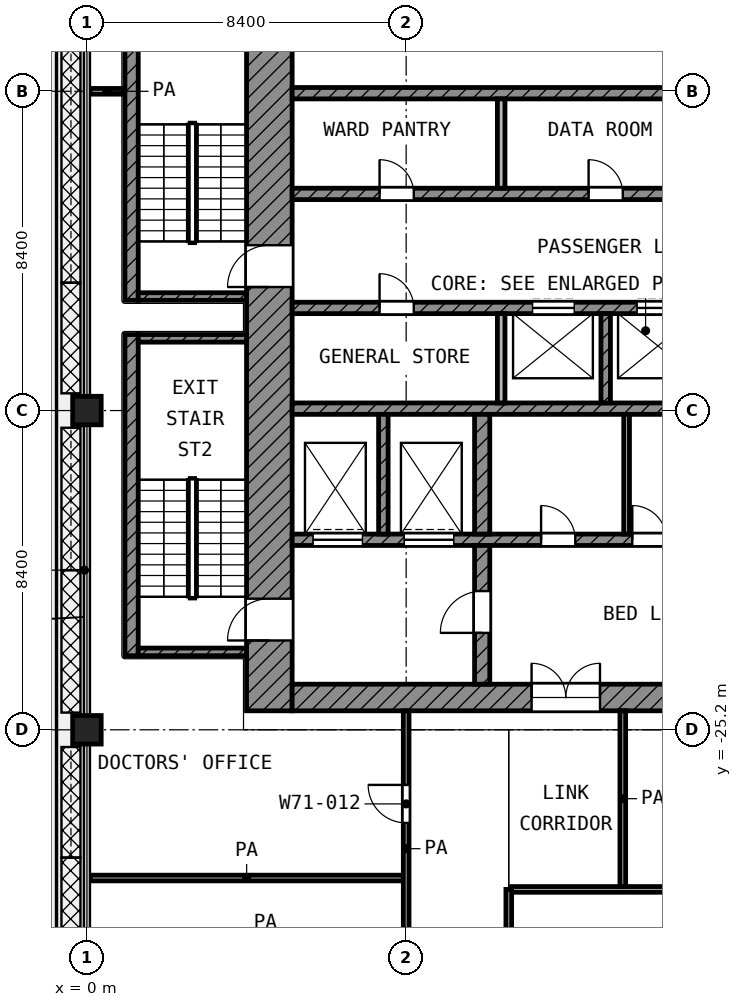
"""IFC4 building model, lengths in metres.
Left out: names, types, materials, properties, quantities, classifications, styles, units other than length and angle.
Written with IfcOpenShell. Run it as: python <this file> out.ifc"""

import sys

from ifc_helpers import new_model, si_unit, direction, frame, frame_2d, origin, origin_2d, place, context, subcontext, project, spatial, rectangle, extrude, element, fill, save


model = new_model("IFC4")
c1 = context("Model", 3, precision=1e-05, world=origin(), true_north=direction((0.0, 1.0)))
c2 = subcontext(c1, "Body", "Model", "MODEL_VIEW")
j1 = project(units=[si_unit("LENGTHUNIT", "METRE"), si_unit("PLANEANGLEUNIT", "RADIAN")], contexts=[c1])
p1 = place(None, origin())
s1 = spatial("IfcSite", under=j1, at=p1, CompositionType="ELEMENT")
p2 = place(p1, origin())
s2 = spatial("IfcBuilding", under=s1, at=p2, CompositionType="ELEMENT")
p3 = place(p2, frame((0.0, 0.0, 328.0)))
s3 = spatial("IfcBuildingStorey", under=s2, at=p3, CompositionType="ELEMENT", Elevation=328.0)
for number, where, z_axis, x_axis in (
    (1, (0.0, -16.8, 0.0), (0.0, 0.0, 1.0), (1.0, 0.0, 0.0)),
    (2, (0.0, -25.2, 0.0), (0.0, 0.0, 1.0), (1.0, 0.0, 0.0)),
):
    element("IfcColumn", number, at=place(p3, frame(where, z_axis=z_axis, x_axis=x_axis)), inside=s3, PredefinedType="COLUMN", context=c2, shape_type="SweptSolid", body=[
        extrude(rectangle(XDim=0.75, YDim=0.75, at=origin_2d()), origin(), (0.0, 0.0, 1.0), 4.2),
    ])
p4 = place(p3, frame((4.8, -24.7, 0.0), z_axis=(0.0, 0.0, 1.0), x_axis=(0.0, 1.0, 0.0)))
e3 = element("IfcWall", 3, at=p4, inside=s3, PredefinedType="SHEAR", context=c2, shape_type="SweptSolid", body=[
    extrude(rectangle(XDim=19.3, YDim=1.2, at=frame_2d((9.65, 0.0))), origin(), (0.0, 0.0, 1.0), 3.78),
])
p5 = place(p4, frame((11.15, 0.0, 0.0)))
e4 = element("IfcOpeningElement", 4, at=p5, cuts=e3, PredefinedType="OPENING", context=c2, shape_type="SweptSolid", body=[
    extrude(rectangle(XDim=1.1, YDim=2.1, at=frame_2d((0.55, 1.05))), frame((0.0, 0.61, 0.0), z_axis=(0.0, -1.0, 0.0), x_axis=(1.0, 0.0, 0.0)), (0.0, 0.0, 1.0), 1.22),
])
p6 = place(p4, frame((1.85, 0.0, 0.0)))
e5 = element("IfcOpeningElement", 5, at=p6, cuts=e3, PredefinedType="OPENING", context=c2, shape_type="SweptSolid", body=[
    extrude(rectangle(XDim=1.1, YDim=2.1, at=frame_2d((0.55, 1.05))), frame((0.0, 0.61, 0.0), z_axis=(0.0, -1.0, 0.0), x_axis=(1.0, 0.0, 0.0)), (0.0, 0.0, 1.0), 1.22),
])
p7 = place(p3, frame((5.4, -24.35, 0.0), z_axis=(0.0, 0.0, 1.0), x_axis=(1.0, 0.0, 0.0)))
e6 = element("IfcWall", 6, at=p7, inside=s3, PredefinedType="SHEAR", context=c2, shape_type="SweptSolid", body=[
    extrude(rectangle(XDim=18.6, YDim=0.7, at=frame_2d((9.3, 0.0))), origin(), (0.0, 0.0, 1.0), 3.78),
])
p8 = place(p7, frame((6.3, 0.0, 0.0)))
e7 = element("IfcOpeningElement", 7, at=p8, cuts=e6, PredefinedType="OPENING", context=c2, shape_type="SweptSolid", body=[
    extrude(rectangle(XDim=1.8, YDim=2.1, at=frame_2d((0.9, 1.05))), frame((0.0, 0.36, 0.0), z_axis=(0.0, -1.0, 0.0), x_axis=(1.0, 0.0, 0.0)), (0.0, 0.0, 1.0), 0.72),
])
p9 = place(p3, frame((5.4, -8.45, 0.0), z_axis=(0.0, 0.0, 1.0), x_axis=(1.0, 0.0, 0.0)))
e8 = element("IfcWall", 8, at=p9, inside=s3, PredefinedType="SHEAR", context=c2, shape_type="SweptSolid", body=[
    extrude(rectangle(XDim=16.65, YDim=0.3, at=frame_2d((8.325, 0.0))), origin(), (0.0, 0.0, 1.0), 3.78),
])
p10 = place(p3, frame((5.4, -11.1, 0.0), z_axis=(0.0, 0.0, 1.0), x_axis=(1.0, 0.0, 0.0)))
e9 = element("IfcWall", 9, at=p10, inside=s3, PredefinedType="SHEAR", context=c2, shape_type="SweptSolid", body=[
    extrude(rectangle(XDim=16.65, YDim=0.3, at=frame_2d((8.325, 0.0))), origin(), (0.0, 0.0, 1.0), 3.78),
])
p11 = place(p10, frame((2.3, 0.0, 0.0)))
e10 = element("IfcOpeningElement", 10, at=p11, cuts=e9, PredefinedType="OPENING", context=c2, shape_type="SweptSolid", body=[
    extrude(rectangle(XDim=0.9, YDim=2.1, at=frame_2d((0.45, 1.05))), frame((0.0, 0.16, 0.0), z_axis=(0.0, -1.0, 0.0), x_axis=(1.0, 0.0, 0.0)), (0.0, 0.0, 1.0), 0.32),
])
p12 = place(p10, frame((7.8, 0.0, 0.0)))
e11 = element("IfcOpeningElement", 11, at=p12, cuts=e9, PredefinedType="OPENING", context=c2, shape_type="SweptSolid", body=[
    extrude(rectangle(XDim=0.9, YDim=2.1, at=frame_2d((0.45, 1.05))), frame((0.0, 0.16, 0.0), z_axis=(0.0, -1.0, 0.0), x_axis=(1.0, 0.0, 0.0)), (0.0, 0.0, 1.0), 0.32),
])
p13 = place(p10, frame((13.3, 0.0, 0.0)))
e12 = element("IfcOpeningElement", 12, at=p13, cuts=e9, PredefinedType="OPENING", context=c2, shape_type="SweptSolid", body=[
    extrude(rectangle(XDim=0.9, YDim=2.1, at=frame_2d((0.45, 1.05))), frame((0.0, 0.16, 0.0), z_axis=(0.0, -1.0, 0.0), x_axis=(1.0, 0.0, 0.0)), (0.0, 0.0, 1.0), 0.32),
])
p14 = place(p3, frame((5.4, -14.1, 0.0), z_axis=(0.0, 0.0, 1.0), x_axis=(1.0, 0.0, 0.0)))
e13 = element("IfcWall", 13, at=p14, inside=s3, PredefinedType="SHEAR", context=c2, shape_type="SweptSolid", body=[
    extrude(rectangle(XDim=16.65, YDim=0.3, at=frame_2d((8.325, 0.0))), origin(), (0.0, 0.0, 1.0), 3.78),
])
p15 = place(p14, frame((6.325, 0.0, 0.0)))
e14 = element("IfcOpeningElement", 14, at=p15, cuts=e13, PredefinedType="OPENING", context=c2, shape_type="SweptSolid", body=[
    extrude(rectangle(XDim=1.1, YDim=2.1, at=frame_2d((0.55, 1.05))), frame((0.0, 0.16, 0.0), z_axis=(0.0, -1.0, 0.0), x_axis=(1.0, 0.0, 0.0)), (0.0, 0.0, 1.0), 0.32),
])
p16 = place(p14, frame((9.075, 0.0, 0.0)))
e15 = element("IfcOpeningElement", 15, at=p16, cuts=e13, PredefinedType="OPENING", context=c2, shape_type="SweptSolid", body=[
    extrude(rectangle(XDim=1.1, YDim=2.1, at=frame_2d((0.55, 1.05))), frame((0.0, 0.16, 0.0), z_axis=(0.0, -1.0, 0.0), x_axis=(1.0, 0.0, 0.0)), (0.0, 0.0, 1.0), 0.32),
])
p17 = place(p14, frame((11.825, 0.0, 0.0)))
e16 = element("IfcOpeningElement", 16, at=p17, cuts=e13, PredefinedType="OPENING", context=c2, shape_type="SweptSolid", body=[
    extrude(rectangle(XDim=1.1, YDim=2.1, at=frame_2d((0.55, 1.05))), frame((0.0, 0.16, 0.0), z_axis=(0.0, -1.0, 0.0), x_axis=(1.0, 0.0, 0.0)), (0.0, 0.0, 1.0), 0.32),
])
p18 = place(p14, frame((14.575, 0.0, 0.0)))
e17 = element("IfcOpeningElement", 17, at=p18, cuts=e13, PredefinedType="OPENING", context=c2, shape_type="SweptSolid", body=[
    extrude(rectangle(XDim=1.1, YDim=2.1, at=frame_2d((0.55, 1.05))), frame((0.0, 0.16, 0.0), z_axis=(0.0, -1.0, 0.0), x_axis=(1.0, 0.0, 0.0)), (0.0, 0.0, 1.0), 0.32),
])
p19 = place(p14, frame((2.3, 0.0, 0.0)))
e18 = element("IfcOpeningElement", 18, at=p19, cuts=e13, PredefinedType="OPENING", context=c2, shape_type="SweptSolid", body=[
    extrude(rectangle(XDim=0.9, YDim=2.1, at=frame_2d((0.45, 1.05))), frame((0.0, 0.16, 0.0), z_axis=(0.0, -1.0, 0.0), x_axis=(1.0, 0.0, 0.0)), (0.0, 0.0, 1.0), 0.32),
])
p20 = place(p3, frame((5.4, -16.75, 0.0), z_axis=(0.0, 0.0, 1.0), x_axis=(1.0, 0.0, 0.0)))
e19 = element("IfcWall", 19, at=p20, inside=s3, PredefinedType="SHEAR", context=c2, shape_type="SweptSolid", body=[
    extrude(rectangle(XDim=16.65, YDim=0.3, at=frame_2d((8.325, 0.0))), origin(), (0.0, 0.0, 1.0), 3.78),
])
p21 = place(p3, frame((5.4, -20.2, 0.0), z_axis=(0.0, 0.0, 1.0), x_axis=(1.0, 0.0, 0.0)))
e20 = element("IfcWall", 20, at=p21, inside=s3, PredefinedType="SHEAR", context=c2, shape_type="SweptSolid", body=[
    extrude(rectangle(XDim=14.65, YDim=0.3, at=frame_2d((7.325, 0.0))), origin(), (0.0, 0.0, 1.0), 3.78),
])
p22 = place(p21, frame((10.55, 0.0, 0.0)))
e21 = element("IfcOpeningElement", 21, at=p22, cuts=e20, PredefinedType="OPENING", context=c2, shape_type="SweptSolid", body=[
    extrude(rectangle(XDim=1.3, YDim=2.1, at=frame_2d((0.65, 1.05))), frame((0.0, 0.16, 0.0), z_axis=(0.0, -1.0, 0.0), x_axis=(1.0, 0.0, 0.0)), (0.0, 0.0, 1.0), 0.32),
])
p23 = place(p21, frame((12.95, 0.0, 0.0)))
e22 = element("IfcOpeningElement", 22, at=p23, cuts=e20, PredefinedType="OPENING", context=c2, shape_type="SweptSolid", body=[
    extrude(rectangle(XDim=1.3, YDim=2.1, at=frame_2d((0.65, 1.05))), frame((0.0, 0.16, 0.0), z_axis=(0.0, -1.0, 0.0), x_axis=(1.0, 0.0, 0.0)), (0.0, 0.0, 1.0), 0.32),
])
p24 = place(p21, frame((0.55, 0.0, 0.0)))
e23 = element("IfcOpeningElement", 23, at=p24, cuts=e20, PredefinedType="OPENING", context=c2, shape_type="SweptSolid", body=[
    extrude(rectangle(XDim=1.3, YDim=2.1, at=frame_2d((0.65, 1.05))), frame((0.0, 0.16, 0.0), z_axis=(0.0, -1.0, 0.0), x_axis=(1.0, 0.0, 0.0)), (0.0, 0.0, 1.0), 0.32),
])
p25 = place(p21, frame((2.95, 0.0, 0.0)))
e24 = element("IfcOpeningElement", 24, at=p25, cuts=e20, PredefinedType="OPENING", context=c2, shape_type="SweptSolid", body=[
    extrude(rectangle(XDim=1.3, YDim=2.1, at=frame_2d((0.65, 1.05))), frame((0.0, 0.16, 0.0), z_axis=(0.0, -1.0, 0.0), x_axis=(1.0, 0.0, 0.0)), (0.0, 0.0, 1.0), 0.32),
])
p26 = place(p21, frame((6.55, 0.0, 0.0)))
e25 = element("IfcOpeningElement", 25, at=p26, cuts=e20, PredefinedType="OPENING", context=c2, shape_type="SweptSolid", body=[
    extrude(rectangle(XDim=0.9, YDim=2.1, at=frame_2d((0.45, 1.05))), frame((0.0, 0.16, 0.0), z_axis=(0.0, -1.0, 0.0), x_axis=(1.0, 0.0, 0.0)), (0.0, 0.0, 1.0), 0.32),
])
p27 = place(p21, frame((8.95, 0.0, 0.0)))
e26 = element("IfcOpeningElement", 26, at=p27, cuts=e20, PredefinedType="OPENING", context=c2, shape_type="SweptSolid", body=[
    extrude(rectangle(XDim=0.9, YDim=2.1, at=frame_2d((0.45, 1.05))), frame((0.0, 0.16, 0.0), z_axis=(0.0, -1.0, 0.0), x_axis=(1.0, 0.0, 0.0)), (0.0, 0.0, 1.0), 0.32),
])
p28 = place(p3, frame((10.4, -24.0, 0.0), z_axis=(0.0, 0.0, 1.0), x_axis=(0.0, 1.0, 0.0)))
e27 = element("IfcWall", 27, at=p28, inside=s3, PredefinedType="SHEAR", context=c2, shape_type="SweptSolid", body=[
    extrude(rectangle(XDim=3.65, YDim=0.4, at=frame_2d((1.825, 0.0))), origin(), (0.0, 0.0, 1.0), 3.78),
])
p29 = place(p28, frame((1.35, 0.0, 0.0)))
e28 = element("IfcOpeningElement", 28, at=p29, cuts=e27, PredefinedType="OPENING", context=c2, shape_type="SweptSolid", body=[
    extrude(rectangle(XDim=1.1, YDim=2.1, at=frame_2d((0.55, 1.05))), frame((0.0, 0.21, 0.0), z_axis=(0.0, -1.0, 0.0), x_axis=(1.0, 0.0, 0.0)), (0.0, 0.0, 1.0), 0.42),
])
p30 = place(p3, frame((10.4, -20.05, 0.0), z_axis=(0.0, 0.0, 1.0), x_axis=(0.0, 1.0, 0.0)))
e29 = element("IfcWall", 29, at=p30, inside=s3, PredefinedType="SHEAR", context=c2, shape_type="SweptSolid", body=[
    extrude(rectangle(XDim=3.15, YDim=0.4, at=frame_2d((1.575, 0.0))), origin(), (0.0, 0.0, 1.0), 3.78),
])
p31 = place(p3, frame((7.8, -20.05, 0.0), z_axis=(0.0, 0.0, 1.0), x_axis=(0.0, 1.0, 0.0)))
e30 = element("IfcWall", 30, at=p31, inside=s3, PredefinedType="SHEAR", context=c2, shape_type="SweptSolid", body=[
    extrude(rectangle(XDim=3.15, YDim=0.25, at=frame_2d((1.575, 0.0))), origin(), (0.0, 0.0, 1.0), 3.78),
])
p32 = place(p3, frame((10.9, -10.95, 0.0), z_axis=(0.0, 0.0, 1.0), x_axis=(0.0, 1.0, 0.0)))
e31 = element("IfcWall", 31, at=p32, inside=s3, PredefinedType="PARTITIONING", context=c2, shape_type="SweptSolid", body=[
    extrude(rectangle(XDim=2.35, YDim=0.2, at=frame_2d((1.175, 0.0))), origin(), (0.0, 0.0, 1.0), 3.78),
])
p33 = place(p3, frame((10.9, -16.6, 0.0), z_axis=(0.0, 0.0, 1.0), x_axis=(0.0, 1.0, 0.0)))
e32 = element("IfcWall", 32, at=p33, inside=s3, PredefinedType="PARTITIONING", context=c2, shape_type="SweptSolid", body=[
    extrude(rectangle(XDim=2.35, YDim=0.2, at=frame_2d((1.175, 0.0))), origin(), (0.0, 0.0, 1.0), 3.78),
])
p34 = place(p3, frame((13.65, -16.6, 0.0), z_axis=(0.0, 0.0, 1.0), x_axis=(0.0, 1.0, 0.0)))
e33 = element("IfcWall", 33, at=p34, inside=s3, PredefinedType="SHEAR", context=c2, shape_type="SweptSolid", body=[
    extrude(rectangle(XDim=2.35, YDim=0.25, at=frame_2d((1.175, 0.0))), origin(), (0.0, 0.0, 1.0), 3.78),
])
p35 = place(p3, frame((14.2, -20.05, 0.0), z_axis=(0.0, 0.0, 1.0), x_axis=(0.0, 1.0, 0.0)))
e34 = element("IfcWall", 34, at=p35, inside=s3, PredefinedType="PARTITIONING", context=c2, shape_type="SweptSolid", body=[
    extrude(rectangle(XDim=3.15, YDim=0.15, at=frame_2d((1.575, 0.0))), origin(), (0.0, 0.0, 1.0), 3.78),
])
p36 = place(p3, frame((1.175, -13.9, 0.0), z_axis=(0.0, 0.0, 1.0), x_axis=(0.0, 1.0, 0.0)))
e35 = element("IfcWall", 35, at=p36, inside=s3, PredefinedType="SHEAR", context=c2, shape_type="SweptSolid", body=[
    extrude(rectangle(XDim=8.45, YDim=0.35, at=frame_2d((4.225, 0.0))), origin(), (0.0, 0.0, 1.0), 3.78),
])
p37 = place(p3, frame((1.35, -13.8, 0.0), z_axis=(0.0, 0.0, 1.0), x_axis=(1.0, 0.0, 0.0)))
e36 = element("IfcWall", 36, at=p37, inside=s3, PredefinedType="SHEAR", context=c2, shape_type="SweptSolid", body=[
    extrude(rectangle(XDim=2.85, YDim=0.2, at=frame_2d((1.425, 0.0))), origin(), (0.0, 0.0, 1.0), 3.78),
])
p38 = place(p3, frame((1.175, -23.25, 0.0), z_axis=(0.0, 0.0, 1.0), x_axis=(0.0, 1.0, 0.0)))
e37 = element("IfcWall", 37, at=p38, inside=s3, PredefinedType="SHEAR", context=c2, shape_type="SweptSolid", body=[
    extrude(rectangle(XDim=8.45, YDim=0.35, at=frame_2d((4.225, 0.0))), origin(), (0.0, 0.0, 1.0), 3.78),
])
for number, where, z_axis, x_axis in (
    (38, (1.35, -14.9, 0.0), (0.0, 0.0, 1.0), (1.0, 0.0, 0.0)),
    (39, (1.35, -23.15, 0.0), (0.0, 0.0, 1.0), (1.0, 0.0, 0.0)),
):
    element("IfcWall", number, at=place(p3, frame(where, z_axis=z_axis, x_axis=x_axis)), inside=s3, PredefinedType="SHEAR", context=c2, shape_type="SweptSolid", body=[
        extrude(rectangle(XDim=2.85, YDim=0.2, at=frame_2d((1.425, 0.0))), origin(), (0.0, 0.0, 1.0), 3.78),
    ])
p39 = place(p3, frame((11.175, -29.4, 0.0), z_axis=(0.0, 0.0, 1.0), x_axis=(1.0, 0.0, 0.0)))
e40 = element("IfcWall", 40, at=p39, inside=s3, PredefinedType="PARTITIONING", context=c2, shape_type="SweptSolid", body=[
    extrude(rectangle(XDim=18.15, YDim=0.15, at=frame_2d((9.075, 0.0))), origin(), (0.0, 0.0, 1.0), 3.78),
])
p40 = place(p3, frame((0.08, -29.1, 0.0), z_axis=(0.0, 0.0, 1.0), x_axis=(1.0, 0.0, 0.0)))
e41 = element("IfcWall", 41, at=p40, inside=s3, PredefinedType="PARTITIONING", context=c2, shape_type="SweptSolid", body=[
    extrude(rectangle(XDim=8.245, YDim=0.15, at=frame_2d((4.123, 0.0))), origin(), (0.0, 0.0, 1.0), 3.78),
])
p41 = place(p3, frame((0.08, -8.4, 0.0), z_axis=(0.0, 0.0, 1.0), x_axis=(1.0, 0.0, 0.0)))
e42 = element("IfcWall", 42, at=p41, inside=s3, PredefinedType="PARTITIONING", context=c2, shape_type="SweptSolid", body=[
    extrude(rectangle(XDim=0.89, YDim=0.15, at=frame_2d((0.445, 0.0))), origin(), (0.0, 0.0, 1.0), 3.78),
])
p42 = place(p3, frame((8.4, -31.957, 0.0), z_axis=(0.0, 0.0, 1.0), x_axis=(0.0, 1.0, 0.0)))
e43 = element("IfcWall", 43, at=p42, inside=s3, PredefinedType="PARTITIONING", context=c2, shape_type="SweptSolid", body=[
    extrude(rectangle(XDim=7.257, YDim=0.15, at=frame_2d((3.628, 0.0))), origin(), (0.0, 0.0, 1.0), 3.78),
])
p43 = place(p42, frame((4.307, 0.0, 0.0)))
e44 = element("IfcOpeningElement", 44, at=p43, cuts=e43, PredefinedType="OPENING", context=c2, shape_type="SweptSolid", body=[
    extrude(rectangle(XDim=1.0, YDim=2.1, at=frame_2d((0.5, 1.05))), frame((0.0, 0.085, 0.0), z_axis=(0.0, -1.0, 0.0), x_axis=(1.0, 0.0, 0.0)), (0.0, 0.0, 1.0), 0.17),
])
p44 = place(p3, frame((11.1, -41.92, 0.0), z_axis=(0.0, 0.0, 1.0), x_axis=(0.0, 1.0, 0.0)))
e45 = element("IfcWall", 45, at=p44, inside=s3, PredefinedType="PARTITIONING", context=c2, shape_type="SweptSolid", body=[
    extrude(rectangle(XDim=12.52, YDim=0.15, at=frame_2d((6.26, 0.0))), origin(), (0.0, 0.0, 1.0), 3.78),
])
p45 = place(p44, frame((9.82, 0.0, 0.0)))
e46 = element("IfcOpeningElement", 46, at=p45, cuts=e45, PredefinedType="OPENING", context=c2, shape_type="SweptSolid", body=[
    extrude(rectangle(XDim=1.2, YDim=2.1, at=frame_2d((0.6, 1.05))), frame((0.0, 0.085, 0.0), z_axis=(0.0, -1.0, 0.0), x_axis=(1.0, 0.0, 0.0)), (0.0, 0.0, 1.0), 0.17),
])
p46 = place(p44, frame((6.02, 0.0, 0.0)))
e47 = element("IfcOpeningElement", 47, at=p46, cuts=e45, PredefinedType="OPENING", context=c2, shape_type="SweptSolid", body=[
    extrude(rectangle(XDim=1.0, YDim=2.1, at=frame_2d((0.5, 1.05))), frame((0.0, 0.085, 0.0), z_axis=(0.0, -1.0, 0.0), x_axis=(1.0, 0.0, 0.0)), (0.0, 0.0, 1.0), 0.17),
])
p47 = place(p44, frame((1.82, 0.0, 0.0)))
e48 = element("IfcOpeningElement", 48, at=p47, cuts=e45, PredefinedType="OPENING", context=c2, shape_type="SweptSolid", body=[
    extrude(rectangle(XDim=1.0, YDim=2.1, at=frame_2d((0.5, 1.05))), frame((0.0, 0.085, 0.0), z_axis=(0.0, -1.0, 0.0), x_axis=(1.0, 0.0, 0.0)), (0.0, 0.0, 1.0), 0.17),
])
p48 = place(p3, frame((14.1, -29.325, 0.0), z_axis=(0.0, 0.0, 1.0), x_axis=(0.0, 1.0, 0.0)))
e49 = element("IfcWall", 49, at=p48, inside=s3, PredefinedType="PARTITIONING", context=c2, shape_type="SweptSolid", body=[
    extrude(rectangle(XDim=4.625, YDim=0.15, at=frame_2d((2.312, 0.0))), origin(), (0.0, 0.0, 1.0), 3.78),
])
p49 = place(p15, origin())
e50 = element("IfcDoor", 50, at=p49, inside=s3, OperationType="DOUBLE_DOOR_SLIDING", PredefinedType="DOOR", context=c2, shape_type="SweptSolid", body=[
    extrude(rectangle(XDim=1.1, YDim=2.1, at=frame_2d((0.55, 1.05))), frame((0.0, 0.025, 0.0), z_axis=(0.0, -1.0, 0.0), x_axis=(1.0, 0.0, 0.0)), (0.0, 0.0, 1.0), 0.05),
])
fill(e14, e50)
p50 = place(p16, origin())
e51 = element("IfcDoor", 51, at=p50, inside=s3, OperationType="DOUBLE_DOOR_SLIDING", PredefinedType="DOOR", context=c2, shape_type="SweptSolid", body=[
    extrude(rectangle(XDim=1.1, YDim=2.1, at=frame_2d((0.55, 1.05))), frame((0.0, 0.025, 0.0), z_axis=(0.0, -1.0, 0.0), x_axis=(1.0, 0.0, 0.0)), (0.0, 0.0, 1.0), 0.05),
])
fill(e15, e51)
p51 = place(p24, origin())
e52 = element("IfcDoor", 52, at=p51, inside=s3, OperationType="DOUBLE_DOOR_SLIDING", PredefinedType="DOOR", context=c2, shape_type="SweptSolid", body=[
    extrude(rectangle(XDim=1.3, YDim=2.1, at=frame_2d((0.65, 1.05))), frame((0.0, 0.025, 0.0), z_axis=(0.0, -1.0, 0.0), x_axis=(1.0, 0.0, 0.0)), (0.0, 0.0, 1.0), 0.05),
])
fill(e23, e52)
p52 = place(p25, origin())
e53 = element("IfcDoor", 53, at=p52, inside=s3, OperationType="DOUBLE_DOOR_SLIDING", PredefinedType="DOOR", context=c2, shape_type="SweptSolid", body=[
    extrude(rectangle(XDim=1.3, YDim=2.1, at=frame_2d((0.65, 1.05))), frame((0.0, 0.025, 0.0), z_axis=(0.0, -1.0, 0.0), x_axis=(1.0, 0.0, 0.0)), (0.0, 0.0, 1.0), 0.05),
])
fill(e24, e53)
p53 = place(p5, origin())
e54 = element("IfcDoor", 54, at=p53, inside=s3, OperationType="SINGLE_SWING_LEFT", PredefinedType="DOOR", context=c2, shape_type="SweptSolid", body=[
    extrude(rectangle(XDim=1.1, YDim=2.1, at=frame_2d((0.55, 1.05))), frame((0.0, 0.025, 0.0), z_axis=(0.0, -1.0, 0.0), x_axis=(1.0, 0.0, 0.0)), (0.0, 0.0, 1.0), 0.05),
])
fill(e4, e54)
p54 = place(p6, origin())
e55 = element("IfcDoor", 55, at=p54, inside=s3, OperationType="SINGLE_SWING_LEFT", PredefinedType="DOOR", context=c2, shape_type="SweptSolid", body=[
    extrude(rectangle(XDim=1.1, YDim=2.1, at=frame_2d((0.55, 1.05))), frame((0.0, 0.025, 0.0), z_axis=(0.0, -1.0, 0.0), x_axis=(1.0, 0.0, 0.0)), (0.0, 0.0, 1.0), 0.05),
])
fill(e5, e55)
p55 = place(p29, origin())
e56 = element("IfcDoor", 56, at=p55, inside=s3, OperationType="SINGLE_SWING_LEFT", PredefinedType="DOOR", context=c2, shape_type="SweptSolid", body=[
    extrude(rectangle(XDim=1.1, YDim=2.1, at=frame_2d((0.55, 1.05))), frame((0.0, 0.025, 0.0), z_axis=(0.0, -1.0, 0.0), x_axis=(1.0, 0.0, 0.0)), (0.0, 0.0, 1.0), 0.05),
])
fill(e28, e56)
p56 = place(p8, origin())
e57 = element("IfcDoor", 57, at=p56, inside=s3, OperationType="DOUBLE_DOOR_SINGLE_SWING", PredefinedType="DOOR", context=c2, shape_type="SweptSolid", body=[
    extrude(rectangle(XDim=1.8, YDim=2.1, at=frame_2d((0.9, 1.05))), frame((0.0, 0.025, 0.0), z_axis=(0.0, -1.0, 0.0), x_axis=(1.0, 0.0, 0.0)), (0.0, 0.0, 1.0), 0.05),
])
fill(e7, e57)
p57 = place(p26, origin())
e58 = element("IfcDoor", 58, at=p57, inside=s3, OperationType="SINGLE_SWING_LEFT", PredefinedType="DOOR", context=c2, shape_type="SweptSolid", body=[
    extrude(rectangle(XDim=0.9, YDim=2.1, at=frame_2d((0.45, 1.05))), frame((0.0, 0.025, 0.0), z_axis=(0.0, -1.0, 0.0), x_axis=(1.0, 0.0, 0.0)), (0.0, 0.0, 1.0), 0.05),
])
fill(e25, e58)
p58 = place(p27, origin())
e59 = element("IfcDoor", 59, at=p58, inside=s3, OperationType="SINGLE_SWING_LEFT", PredefinedType="DOOR", context=c2, shape_type="SweptSolid", body=[
    extrude(rectangle(XDim=0.9, YDim=2.1, at=frame_2d((0.45, 1.05))), frame((0.0, 0.025, 0.0), z_axis=(0.0, -1.0, 0.0), x_axis=(1.0, 0.0, 0.0)), (0.0, 0.0, 1.0), 0.05),
])
fill(e26, e59)
p59 = place(p11, origin())
e60 = element("IfcDoor", 60, at=p59, inside=s3, OperationType="SINGLE_SWING_LEFT", PredefinedType="DOOR", context=c2, shape_type="SweptSolid", body=[
    extrude(rectangle(XDim=0.9, YDim=2.1, at=frame_2d((0.45, 1.05))), frame((0.0, 0.025, 0.0), z_axis=(0.0, -1.0, 0.0), x_axis=(1.0, 0.0, 0.0)), (0.0, 0.0, 1.0), 0.05),
])
fill(e10, e60)
p60 = place(p12, origin())
e61 = element("IfcDoor", 61, at=p60, inside=s3, OperationType="SINGLE_SWING_LEFT", PredefinedType="DOOR", context=c2, shape_type="SweptSolid", body=[
    extrude(rectangle(XDim=0.9, YDim=2.1, at=frame_2d((0.45, 1.05))), frame((0.0, 0.025, 0.0), z_axis=(0.0, -1.0, 0.0), x_axis=(1.0, 0.0, 0.0)), (0.0, 0.0, 1.0), 0.05),
])
fill(e11, e61)
p61 = place(p19, origin())
e62 = element("IfcDoor", 62, at=p61, inside=s3, OperationType="SINGLE_SWING_LEFT", PredefinedType="DOOR", context=c2, shape_type="SweptSolid", body=[
    extrude(rectangle(XDim=0.9, YDim=2.1, at=frame_2d((0.45, 1.05))), frame((0.0, 0.025, 0.0), z_axis=(0.0, -1.0, 0.0), x_axis=(1.0, 0.0, 0.0)), (0.0, 0.0, 1.0), 0.05),
])
fill(e18, e62)
p62 = place(p43, origin())
e63 = element("IfcDoor", 63, at=p62, inside=s3, OperationType="SINGLE_SWING_RIGHT", PredefinedType="DOOR", context=c2, shape_type="SweptSolid", body=[
    extrude(rectangle(XDim=1.0, YDim=2.1, at=frame_2d((0.5, 1.05))), frame((0.0, 0.025, 0.0), z_axis=(0.0, -1.0, 0.0), x_axis=(1.0, 0.0, 0.0)), (0.0, 0.0, 1.0), 0.05),
])
fill(e44, e63)
save(model, sys.argv[1])
